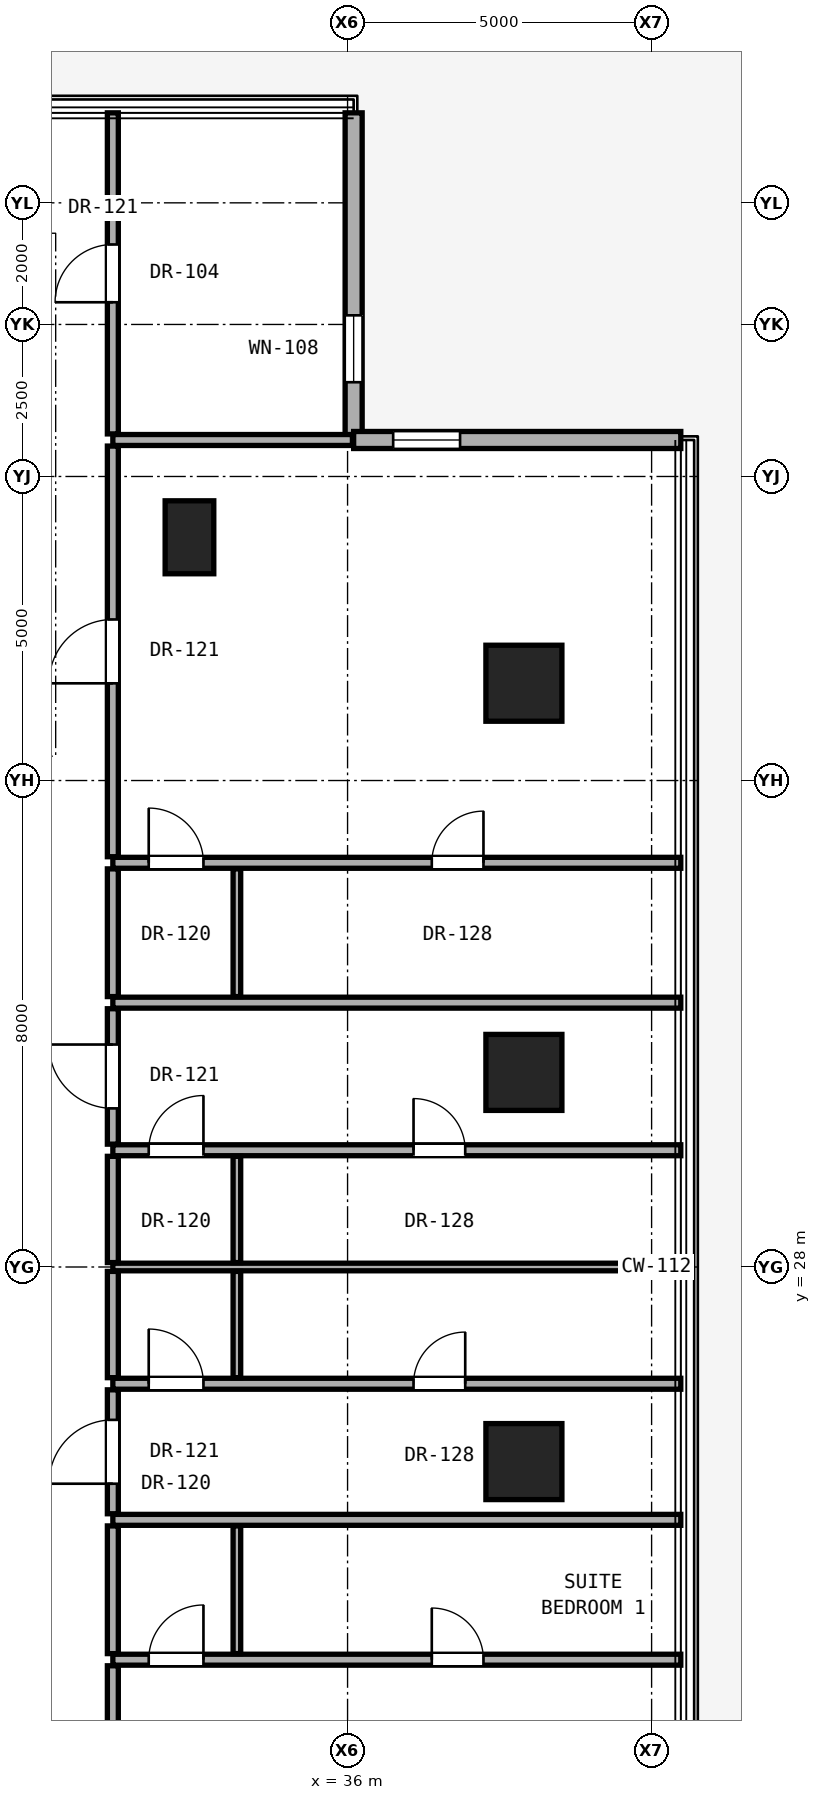
"""IFC4 building model, lengths in metres.
Left out: names, types, materials, properties, quantities, classifications, styles, units other than length and angle.
Written with IfcOpenShell. Run it as: python <this file> out.ifc"""

import sys

from ifc_helpers import new_model, si_unit, direction, frame, frame_2d, origin, origin_2d, place, context, subcontext, project, spatial, rectangle, hollow_rectangle, extrude, element, fill, save


model = new_model("IFC4")
c1 = context("Model", 3, precision=1e-05, world=origin(), true_north=direction((0.0, 1.0)))
c2 = subcontext(c1, "Body", "Model", "MODEL_VIEW")
j1 = project(units=[si_unit("LENGTHUNIT", "METRE"), si_unit("PLANEANGLEUNIT", "RADIAN")], contexts=[c1])
p1 = place(None, origin())
s1 = spatial("IfcSite", under=j1, at=p1, CompositionType="ELEMENT")
p2 = place(p1, origin())
s2 = spatial("IfcBuilding", under=s1, at=p2, CompositionType="ELEMENT")
p3 = place(p2, frame((0.0, 0.0, 22.4)))
s3 = spatial("IfcBuildingStorey", under=s2, at=p3, CompositionType="ELEMENT", Elevation=22.4)
for number, where, z_axis, x_axis in (
    (1, (38.9, 24.8, 0.0), (0.0, 0.0, 1.0), (1.0, 0.0, 0.0)),
    (2, (38.9, 31.2, 0.0), (0.0, 0.0, 1.0), (1.0, 0.0, 0.0)),
    (3, (38.9, 37.6, 0.0), (0.0, 0.0, 1.0), (1.0, 0.0, 0.0)),
):
    element("IfcColumn", number, at=place(p3, frame(where, z_axis=z_axis, x_axis=x_axis)), inside=s3, PredefinedType="COLUMN", context=c2, shape_type="SweptSolid", body=[
        extrude(hollow_rectangle(XDim=1.25, YDim=1.25, WallThickness=0.07, at=origin_2d()), origin(), (0.0, 0.0, 1.0), 3.3),
    ])
p4 = place(p3, frame((33.4, 40.0, 0.0), z_axis=(0.0, 0.0, 1.0), x_axis=(1.0, 0.0, 0.0)))
e4 = element("IfcColumn", 4, at=p4, inside=s3, PredefinedType="PILASTER", context=c2, shape_type="SweptSolid", body=[
    extrude(rectangle(XDim=0.8, YDim=1.2, at=origin_2d()), origin(), (0.0, 0.0, 1.0), 3.3),
])
p5 = place(p3, frame((36.1, 41.6, 0.0), z_axis=(0.0, 0.0, 1.0), x_axis=(0.0, 1.0, 0.0)))
e5 = element("IfcWall", 5, at=p5, inside=s3, PredefinedType="SOLIDWALL", context=c2, shape_type="SweptSolid", body=[
    extrude(rectangle(XDim=5.38, YDim=0.28, at=frame_2d((2.69, 0.0))), origin(), (0.0, 0.0, 1.0), 3.04),
])
p6 = place(p5, frame((0.95, 0.0, 0.85)))
e6 = element("IfcOpeningElement", 6, at=p6, cuts=e5, PredefinedType="OPENING", context=c2, shape_type="SweptSolid", body=[
    extrude(rectangle(XDim=1.1, YDim=2.0, at=frame_2d((0.55, 1.0))), frame((0.0, 0.15, 0.0), z_axis=(0.0, -1.0, 0.0), x_axis=(1.0, 0.0, 0.0)), (0.0, 0.0, 1.0), 0.3),
])
p7 = place(p3, frame((41.48, 41.6, 0.0), z_axis=(0.0, 0.0, 1.0), x_axis=(-1.0, 0.0, 0.0)))
e7 = element("IfcWall", 7, at=p7, inside=s3, PredefinedType="SOLIDWALL", context=c2, shape_type="SweptSolid", body=[
    extrude(rectangle(XDim=5.38, YDim=0.28, at=frame_2d((2.69, 0.0))), origin(), (0.0, 0.0, 1.0), 3.04),
])
p8 = place(p7, frame((3.63, 0.0, 0.85)))
e8 = element("IfcOpeningElement", 8, at=p8, cuts=e7, PredefinedType="OPENING", context=c2, shape_type="SweptSolid", body=[
    extrude(rectangle(XDim=1.1, YDim=2.0, at=frame_2d((0.55, 1.0))), frame((0.0, 0.15, 0.0), z_axis=(0.0, -1.0, 0.0), x_axis=(1.0, 0.0, 0.0)), (0.0, 0.0, 1.0), 0.3),
])
p9 = place(p3, frame((32.14, 21.542, 0.0), z_axis=(0.0, 0.0, 1.0), x_axis=(1.0, 0.0, 0.0)))
e9 = element("IfcWall", 9, at=p9, inside=s3, PredefinedType="PARTITIONING", context=c2, shape_type="SweptSolid", body=[
    extrude(rectangle(XDim=9.34, YDim=0.18, at=frame_2d((4.67, 0.0))), origin(), (0.0, 0.0, 1.0), 2.125),
])
p10 = place(p9, frame((5.245, 0.0, 0.0)))
e10 = element("IfcOpeningElement", 10, at=p10, cuts=e9, PredefinedType="OPENING", context=c2, shape_type="SweptSolid", body=[
    extrude(rectangle(XDim=0.85, YDim=2.01, at=frame_2d((0.425, 1.005))), frame((0.0, 0.1, 0.0), z_axis=(0.0, -1.0, 0.0), x_axis=(1.0, 0.0, 0.0)), (0.0, 0.0, 1.0), 0.2),
])
p11 = place(p9, frame((0.59, 0.0, 0.0)))
e11 = element("IfcOpeningElement", 11, at=p11, cuts=e9, PredefinedType="OPENING", context=c2, shape_type="SweptSolid", body=[
    extrude(rectangle(XDim=0.9, YDim=2.1, at=frame_2d((0.45, 1.05))), frame((0.0, 0.1, 0.0), z_axis=(0.0, -1.0, 0.0), x_axis=(1.0, 0.0, 0.0)), (0.0, 0.0, 1.0), 0.2),
])
p12 = place(p3, frame((32.14, 23.842, 0.0), z_axis=(0.0, 0.0, 1.0), x_axis=(1.0, 0.0, 0.0)))
e12 = element("IfcWall", 12, at=p12, inside=s3, PredefinedType="PARTITIONING", context=c2, shape_type="SweptSolid", body=[
    extrude(rectangle(XDim=9.34, YDim=0.18, at=frame_2d((4.67, 0.0))), origin(), (0.0, 0.0, 1.0), 2.125),
])
p13 = place(p3, frame((32.14, 26.08, 0.0), z_axis=(0.0, 0.0, 1.0), x_axis=(1.0, 0.0, 0.0)))
e13 = element("IfcWall", 13, at=p13, inside=s3, PredefinedType="PARTITIONING", context=c2, shape_type="SweptSolid", body=[
    extrude(rectangle(XDim=9.34, YDim=0.18, at=frame_2d((4.67, 0.0))), origin(), (0.0, 0.0, 1.0), 2.125),
])
p14 = place(p13, frame((4.945, 0.0, 0.0)))
e14 = element("IfcOpeningElement", 14, at=p14, cuts=e13, PredefinedType="OPENING", context=c2, shape_type="SweptSolid", body=[
    extrude(rectangle(XDim=0.85, YDim=2.01, at=frame_2d((0.425, 1.005))), frame((0.0, 0.1, 0.0), z_axis=(0.0, -1.0, 0.0), x_axis=(1.0, 0.0, 0.0)), (0.0, 0.0, 1.0), 0.2),
])
p15 = place(p13, frame((0.59, 0.0, 0.0)))
e15 = element("IfcOpeningElement", 15, at=p15, cuts=e13, PredefinedType="OPENING", context=c2, shape_type="SweptSolid", body=[
    extrude(rectangle(XDim=0.9, YDim=2.1, at=frame_2d((0.45, 1.05))), frame((0.0, 0.1, 0.0), z_axis=(0.0, -1.0, 0.0), x_axis=(1.0, 0.0, 0.0)), (0.0, 0.0, 1.0), 0.2),
])
p16 = place(p3, frame((32.14, 28.0, 0.0), z_axis=(0.0, 0.0, 1.0), x_axis=(1.0, 0.0, 0.0)))
e16 = element("IfcWall", 16, at=p16, inside=s3, PredefinedType="PARTITIONING", context=c2, shape_type="SweptSolid", body=[
    extrude(rectangle(XDim=9.34, YDim=0.125, at=frame_2d((4.67, 0.0))), origin(), (0.0, 0.0, 1.0), 2.125),
])
p17 = place(p3, frame((32.14, 29.92, 0.0), z_axis=(0.0, 0.0, 1.0), x_axis=(1.0, 0.0, 0.0)))
e17 = element("IfcWall", 17, at=p17, inside=s3, PredefinedType="PARTITIONING", context=c2, shape_type="SweptSolid", body=[
    extrude(rectangle(XDim=9.34, YDim=0.18, at=frame_2d((4.67, 0.0))), origin(), (0.0, 0.0, 1.0), 2.125),
])
p18 = place(p17, frame((4.945, 0.0, 0.0)))
e18 = element("IfcOpeningElement", 18, at=p18, cuts=e17, PredefinedType="OPENING", context=c2, shape_type="SweptSolid", body=[
    extrude(rectangle(XDim=0.85, YDim=2.01, at=frame_2d((0.425, 1.005))), frame((0.0, 0.1, 0.0), z_axis=(0.0, -1.0, 0.0), x_axis=(1.0, 0.0, 0.0)), (0.0, 0.0, 1.0), 0.2),
])
p19 = place(p17, frame((0.59, 0.0, 0.0)))
e19 = element("IfcOpeningElement", 19, at=p19, cuts=e17, PredefinedType="OPENING", context=c2, shape_type="SweptSolid", body=[
    extrude(rectangle(XDim=0.9, YDim=2.1, at=frame_2d((0.45, 1.05))), frame((0.0, 0.1, 0.0), z_axis=(0.0, -1.0, 0.0), x_axis=(1.0, 0.0, 0.0)), (0.0, 0.0, 1.0), 0.2),
])
p20 = place(p3, frame((32.14, 32.347, 0.0), z_axis=(0.0, 0.0, 1.0), x_axis=(1.0, 0.0, 0.0)))
e20 = element("IfcWall", 20, at=p20, inside=s3, PredefinedType="PARTITIONING", context=c2, shape_type="SweptSolid", body=[
    extrude(rectangle(XDim=9.34, YDim=0.18, at=frame_2d((4.67, 0.0))), origin(), (0.0, 0.0, 1.0), 2.125),
])
p21 = place(p3, frame((32.14, 34.647, 0.0), z_axis=(0.0, 0.0, 1.0), x_axis=(1.0, 0.0, 0.0)))
e21 = element("IfcWall", 21, at=p21, inside=s3, PredefinedType="PARTITIONING", context=c2, shape_type="SweptSolid", body=[
    extrude(rectangle(XDim=9.34, YDim=0.18, at=frame_2d((4.67, 0.0))), origin(), (0.0, 0.0, 1.0), 2.125),
])
p22 = place(p21, frame((5.245, 0.0, 0.0)))
e22 = element("IfcOpeningElement", 22, at=p22, cuts=e21, PredefinedType="OPENING", context=c2, shape_type="SweptSolid", body=[
    extrude(rectangle(XDim=0.85, YDim=2.01, at=frame_2d((0.425, 1.005))), frame((0.0, 0.1, 0.0), z_axis=(0.0, -1.0, 0.0), x_axis=(1.0, 0.0, 0.0)), (0.0, 0.0, 1.0), 0.2),
])
p23 = place(p21, frame((0.59, 0.0, 0.0)))
e23 = element("IfcOpeningElement", 23, at=p23, cuts=e21, PredefinedType="OPENING", context=c2, shape_type="SweptSolid", body=[
    extrude(rectangle(XDim=0.9, YDim=2.1, at=frame_2d((0.45, 1.05))), frame((0.0, 0.1, 0.0), z_axis=(0.0, -1.0, 0.0), x_axis=(1.0, 0.0, 0.0)), (0.0, 0.0, 1.0), 0.2),
])
p24 = place(p3, frame((32.14, 41.6, 0.0), z_axis=(0.0, 0.0, 1.0), x_axis=(1.0, 0.0, 0.0)))
e24 = element("IfcWall", 24, at=p24, inside=s3, PredefinedType="PARTITIONING", context=c2, shape_type="SweptSolid", body=[
    extrude(rectangle(XDim=3.94, YDim=0.18, at=frame_2d((1.97, 0.0))), origin(), (0.0, 0.0, 1.0), 3.06),
])
p25 = place(p3, frame((32.14, 14.5, 0.0), z_axis=(0.0, 0.0, 1.0), x_axis=(0.0, 1.0, 0.0)))
e25 = element("IfcWall", 25, at=p25, inside=s3, PredefinedType="PARTITIONING", context=c2, shape_type="SweptSolid", body=[
    extrude(rectangle(XDim=6.942, YDim=0.18, at=frame_2d((3.471, 0.0))), origin(), (0.0, 0.0, 1.0), 2.436),
])
p26 = place(p25, frame((2.946, 0.0, 0.0)))
e26 = element("IfcOpeningElement", 26, at=p26, cuts=e25, PredefinedType="OPENING", context=c2, shape_type="SweptSolid", body=[
    extrude(rectangle(XDim=1.05, YDim=2.2, at=frame_2d((0.525, 1.1))), frame((0.0, 0.1, 0.0), z_axis=(0.0, -1.0, 0.0), x_axis=(1.0, 0.0, 0.0)), (0.0, 0.0, 1.0), 0.2),
])
p27 = place(p3, frame((32.14, 21.642, 0.0), z_axis=(0.0, 0.0, 1.0), x_axis=(0.0, 1.0, 0.0)))
e27 = element("IfcWall", 27, at=p27, inside=s3, PredefinedType="PARTITIONING", context=c2, shape_type="SweptSolid", body=[
    extrude(rectangle(XDim=2.1, YDim=0.18, at=frame_2d((1.05, 0.0))), origin(), (0.0, 0.0, 1.0), 3.06),
])
p28 = place(p3, frame((32.14, 23.942, 0.0), z_axis=(0.0, 0.0, 1.0), x_axis=(0.0, 1.0, 0.0)))
e28 = element("IfcWall", 28, at=p28, inside=s3, PredefinedType="PARTITIONING", context=c2, shape_type="SweptSolid", body=[
    extrude(rectangle(XDim=2.038, YDim=0.18, at=frame_2d((1.019, 0.0))), origin(), (0.0, 0.0, 1.0), 2.279),
])
p29 = place(p28, frame((0.494, 0.0, 0.0)))
e29 = element("IfcOpeningElement", 29, at=p29, cuts=e28, PredefinedType="OPENING", context=c2, shape_type="SweptSolid", body=[
    extrude(rectangle(XDim=1.05, YDim=2.2, at=frame_2d((0.525, 1.1))), frame((0.0, 0.1, 0.0), z_axis=(0.0, -1.0, 0.0), x_axis=(1.0, 0.0, 0.0)), (0.0, 0.0, 1.0), 0.2),
])
for number, where, z_axis, x_axis in (
    (30, (32.14, 26.18, 0.0), (0.0, 0.0, 1.0), (0.0, 1.0, 0.0)),
    (31, (32.14, 28.073, 0.0), (0.0, 0.0, 1.0), (0.0, 1.0, 0.0)),
):
    element("IfcWall", number, at=place(p3, frame(where, z_axis=z_axis, x_axis=x_axis)), inside=s3, PredefinedType="PARTITIONING", context=c2, shape_type="SweptSolid", body=[
        extrude(rectangle(XDim=1.748, YDim=0.18, at=frame_2d((0.874, 0.0))), origin(), (0.0, 0.0, 1.0), 3.06),
    ])
p30 = place(p3, frame((32.14, 30.02, 0.0), z_axis=(0.0, 0.0, 1.0), x_axis=(0.0, 1.0, 0.0)))
e32 = element("IfcWall", 32, at=p30, inside=s3, PredefinedType="PARTITIONING", context=c2, shape_type="SweptSolid", body=[
    extrude(rectangle(XDim=2.227, YDim=0.18, at=frame_2d((1.114, 0.0))), origin(), (0.0, 0.0, 1.0), 2.279),
])
p31 = place(p30, frame((0.588, 0.0, 0.0)))
e33 = element("IfcOpeningElement", 33, at=p31, cuts=e32, PredefinedType="OPENING", context=c2, shape_type="SweptSolid", body=[
    extrude(rectangle(XDim=1.05, YDim=2.2, at=frame_2d((0.525, 1.1))), frame((0.0, 0.1, 0.0), z_axis=(0.0, -1.0, 0.0), x_axis=(1.0, 0.0, 0.0)), (0.0, 0.0, 1.0), 0.2),
])
p32 = place(p3, frame((32.14, 32.447, 0.0), z_axis=(0.0, 0.0, 1.0), x_axis=(0.0, 1.0, 0.0)))
e34 = element("IfcWall", 34, at=p32, inside=s3, PredefinedType="PARTITIONING", context=c2, shape_type="SweptSolid", body=[
    extrude(rectangle(XDim=2.1, YDim=0.18, at=frame_2d((1.05, 0.0))), origin(), (0.0, 0.0, 1.0), 3.06),
])
p33 = place(p3, frame((32.14, 34.747, 0.0), z_axis=(0.0, 0.0, 1.0), x_axis=(0.0, 1.0, 0.0)))
e35 = element("IfcWall", 35, at=p33, inside=s3, PredefinedType="PARTITIONING", context=c2, shape_type="SweptSolid", body=[
    extrude(rectangle(XDim=6.753, YDim=0.18, at=frame_2d((3.376, 0.0))), origin(), (0.0, 0.0, 1.0), 2.436),
])
p34 = place(p33, frame((2.852, 0.0, 0.0)))
e36 = element("IfcOpeningElement", 36, at=p34, cuts=e35, PredefinedType="OPENING", context=c2, shape_type="SweptSolid", body=[
    extrude(rectangle(XDim=1.05, YDim=2.2, at=frame_2d((0.525, 1.1))), frame((0.0, 0.1, 0.0), z_axis=(0.0, -1.0, 0.0), x_axis=(1.0, 0.0, 0.0)), (0.0, 0.0, 1.0), 0.2),
])
p35 = place(p3, frame((32.14, 41.7, 0.0), z_axis=(0.0, 0.0, 1.0), x_axis=(0.0, 1.0, 0.0)))
e37 = element("IfcWall", 37, at=p35, inside=s3, PredefinedType="PARTITIONING", context=c2, shape_type="SweptSolid", body=[
    extrude(rectangle(XDim=5.28, YDim=0.18, at=frame_2d((2.64, 0.0))), origin(), (0.0, 0.0, 1.0), 3.06),
])
p36 = place(p35, frame((2.165, 0.0, 0.0)))
e38 = element("IfcOpeningElement", 38, at=p36, cuts=e37, PredefinedType="OPENING", context=c2, shape_type="SweptSolid", body=[
    extrude(rectangle(XDim=0.95, YDim=2.15, at=frame_2d((0.475, 1.075))), frame((0.0, 0.1, 0.0), z_axis=(0.0, -1.0, 0.0), x_axis=(1.0, 0.0, 0.0)), (0.0, 0.0, 1.0), 0.2),
])
p37 = place(p3, frame((34.18, 21.642, 0.0), z_axis=(0.0, 0.0, 1.0), x_axis=(0.0, 1.0, 0.0)))
e39 = element("IfcWall", 39, at=p37, inside=s3, PredefinedType="PARTITIONING", context=c2, shape_type="SweptSolid", body=[
    extrude(rectangle(XDim=2.1, YDim=0.125, at=frame_2d((1.05, 0.0))), origin(), (0.0, 0.0, 1.0), 3.06),
])
for number, where, z_axis, x_axis in (
    (40, (34.18, 26.18, 0.0), (0.0, 0.0, 1.0), (0.0, 1.0, 0.0)),
    (41, (34.18, 28.073, 0.0), (0.0, 0.0, 1.0), (0.0, 1.0, 0.0)),
):
    element("IfcWall", number, at=place(p3, frame(where, z_axis=z_axis, x_axis=x_axis)), inside=s3, PredefinedType="PARTITIONING", context=c2, shape_type="SweptSolid", body=[
        extrude(rectangle(XDim=1.748, YDim=0.125, at=frame_2d((0.874, 0.0))), origin(), (0.0, 0.0, 1.0), 3.06),
    ])
p38 = place(p3, frame((34.18, 32.447, 0.0), z_axis=(0.0, 0.0, 1.0), x_axis=(0.0, 1.0, 0.0)))
e42 = element("IfcWall", 42, at=p38, inside=s3, PredefinedType="PARTITIONING", context=c2, shape_type="SweptSolid", body=[
    extrude(rectangle(XDim=2.1, YDim=0.125, at=frame_2d((1.05, 0.0))), origin(), (0.0, 0.0, 1.0), 3.06),
])
p39 = place(p6, origin())
e43 = element("IfcWindow", 43, at=p39, inside=s3, PartitioningType="SINGLE_PANEL", PredefinedType="WINDOW", context=c2, shape_type="SweptSolid", body=[
    extrude(rectangle(XDim=1.1, YDim=2.0, at=frame_2d((0.55, 1.0))), frame((0.0, 0.03, 0.0), z_axis=(0.0, -1.0, 0.0), x_axis=(1.0, 0.0, 0.0)), (0.0, 0.0, 1.0), 0.06),
])
fill(e6, e43)
p40 = place(p8, origin())
e44 = element("IfcWindow", 44, at=p40, inside=s3, PartitioningType="SINGLE_PANEL", PredefinedType="WINDOW", context=c2, shape_type="SweptSolid", body=[
    extrude(rectangle(XDim=1.1, YDim=2.0, at=frame_2d((0.55, 1.0))), frame((0.0, 0.03, 0.0), z_axis=(0.0, -1.0, 0.0), x_axis=(1.0, 0.0, 0.0)), (0.0, 0.0, 1.0), 0.06),
])
fill(e8, e44)
p41 = place(p10, origin())
e45 = element("IfcDoor", 45, at=p41, inside=s3, OperationType="SINGLE_SWING_LEFT", PredefinedType="DOOR", context=c2, shape_type="SweptSolid", body=[
    extrude(rectangle(XDim=0.85, YDim=2.01, at=frame_2d((0.425, 1.005))), frame((0.0, 0.025, 0.0), z_axis=(0.0, -1.0, 0.0), x_axis=(1.0, 0.0, 0.0)), (0.0, 0.0, 1.0), 0.05),
])
fill(e10, e45)
p42 = place(p11, origin())
e46 = element("IfcDoor", 46, at=p42, inside=s3, OperationType="SINGLE_SWING_RIGHT", PredefinedType="DOOR", context=c2, shape_type="SweptSolid", body=[
    extrude(rectangle(XDim=0.9, YDim=2.1, at=frame_2d((0.45, 1.05))), frame((0.0, 0.025, 0.0), z_axis=(0.0, -1.0, 0.0), x_axis=(1.0, 0.0, 0.0)), (0.0, 0.0, 1.0), 0.05),
])
fill(e11, e46)
p43 = place(p29, origin())
e47 = element("IfcDoor", 47, at=p43, inside=s3, OperationType="SINGLE_SWING_LEFT", PredefinedType="DOOR", context=c2, shape_type="SweptSolid", body=[
    extrude(rectangle(XDim=1.05, YDim=2.2, at=frame_2d((0.525, 1.1))), frame((0.0, 0.025, 0.0), z_axis=(0.0, -1.0, 0.0), x_axis=(1.0, 0.0, 0.0)), (0.0, 0.0, 1.0), 0.05),
])
fill(e29, e47)
p44 = place(p14, origin())
e48 = element("IfcDoor", 48, at=p44, inside=s3, OperationType="SINGLE_SWING_RIGHT", PredefinedType="DOOR", context=c2, shape_type="SweptSolid", body=[
    extrude(rectangle(XDim=0.85, YDim=2.01, at=frame_2d((0.425, 1.005))), frame((0.0, 0.025, 0.0), z_axis=(0.0, -1.0, 0.0), x_axis=(1.0, 0.0, 0.0)), (0.0, 0.0, 1.0), 0.05),
])
fill(e14, e48)
p45 = place(p15, origin())
e49 = element("IfcDoor", 49, at=p45, inside=s3, OperationType="SINGLE_SWING_LEFT", PredefinedType="DOOR", context=c2, shape_type="SweptSolid", body=[
    extrude(rectangle(XDim=0.9, YDim=2.1, at=frame_2d((0.45, 1.05))), frame((0.0, 0.025, 0.0), z_axis=(0.0, -1.0, 0.0), x_axis=(1.0, 0.0, 0.0)), (0.0, 0.0, 1.0), 0.05),
])
fill(e15, e49)
p46 = place(p31, origin())
e50 = element("IfcDoor", 50, at=p46, inside=s3, OperationType="SINGLE_SWING_RIGHT", PredefinedType="DOOR", context=c2, shape_type="SweptSolid", body=[
    extrude(rectangle(XDim=1.05, YDim=2.2, at=frame_2d((0.525, 1.1))), frame((0.0, 0.025, 0.0), z_axis=(0.0, -1.0, 0.0), x_axis=(1.0, 0.0, 0.0)), (0.0, 0.0, 1.0), 0.05),
])
fill(e33, e50)
p47 = place(p18, origin())
e51 = element("IfcDoor", 51, at=p47, inside=s3, OperationType="SINGLE_SWING_LEFT", PredefinedType="DOOR", context=c2, shape_type="SweptSolid", body=[
    extrude(rectangle(XDim=0.85, YDim=2.01, at=frame_2d((0.425, 1.005))), frame((0.0, 0.025, 0.0), z_axis=(0.0, -1.0, 0.0), x_axis=(1.0, 0.0, 0.0)), (0.0, 0.0, 1.0), 0.05),
])
fill(e18, e51)
p48 = place(p19, origin())
e52 = element("IfcDoor", 52, at=p48, inside=s3, OperationType="SINGLE_SWING_RIGHT", PredefinedType="DOOR", context=c2, shape_type="SweptSolid", body=[
    extrude(rectangle(XDim=0.9, YDim=2.1, at=frame_2d((0.45, 1.05))), frame((0.0, 0.025, 0.0), z_axis=(0.0, -1.0, 0.0), x_axis=(1.0, 0.0, 0.0)), (0.0, 0.0, 1.0), 0.05),
])
fill(e19, e52)
p49 = place(p34, origin())
e53 = element("IfcDoor", 53, at=p49, inside=s3, OperationType="SINGLE_SWING_LEFT", PredefinedType="DOOR", context=c2, shape_type="SweptSolid", body=[
    extrude(rectangle(XDim=1.05, YDim=2.2, at=frame_2d((0.525, 1.1))), frame((0.0, 0.025, 0.0), z_axis=(0.0, -1.0, 0.0), x_axis=(1.0, 0.0, 0.0)), (0.0, 0.0, 1.0), 0.05),
])
fill(e36, e53)
p50 = place(p22, origin())
e54 = element("IfcDoor", 54, at=p50, inside=s3, OperationType="SINGLE_SWING_RIGHT", PredefinedType="DOOR", context=c2, shape_type="SweptSolid", body=[
    extrude(rectangle(XDim=0.85, YDim=2.01, at=frame_2d((0.425, 1.005))), frame((0.0, 0.025, 0.0), z_axis=(0.0, -1.0, 0.0), x_axis=(1.0, 0.0, 0.0)), (0.0, 0.0, 1.0), 0.05),
])
fill(e22, e54)
p51 = place(p23, origin())
e55 = element("IfcDoor", 55, at=p51, inside=s3, OperationType="SINGLE_SWING_LEFT", PredefinedType="DOOR", context=c2, shape_type="SweptSolid", body=[
    extrude(rectangle(XDim=0.9, YDim=2.1, at=frame_2d((0.45, 1.05))), frame((0.0, 0.025, 0.0), z_axis=(0.0, -1.0, 0.0), x_axis=(1.0, 0.0, 0.0)), (0.0, 0.0, 1.0), 0.05),
])
fill(e23, e55)
p52 = place(p36, origin())
e56 = element("IfcDoor", 56, at=p52, inside=s3, OperationType="SINGLE_SWING_LEFT", PredefinedType="DOOR", context=c2, shape_type="SweptSolid", body=[
    extrude(rectangle(XDim=0.95, YDim=2.15, at=frame_2d((0.475, 1.075))), frame((0.0, 0.025, 0.0), z_axis=(0.0, -1.0, 0.0), x_axis=(1.0, 0.0, 0.0)), (0.0, 0.0, 1.0), 0.05),
])
fill(e38, e56)
save(model, sys.argv[1])
